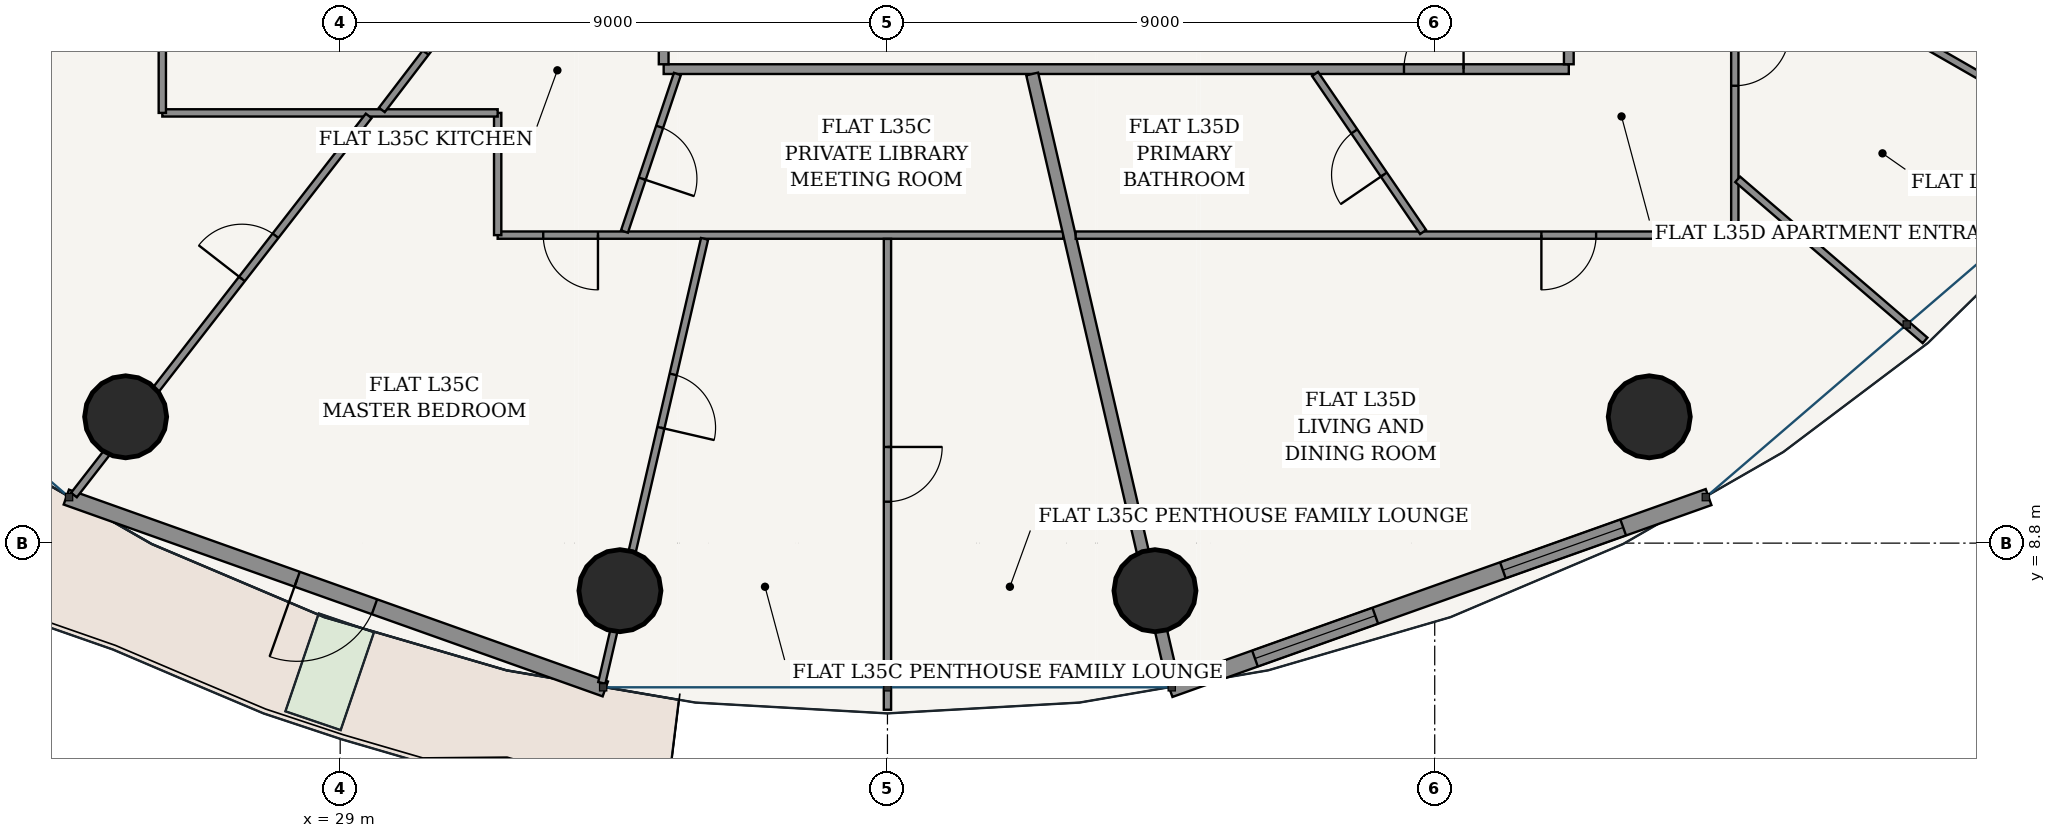
"""IFC4 building model, lengths in metres.
Left out: names, types, materials, properties, quantities, classifications, styles, units other than length and angle.
Written with IfcOpenShell. Run it as: python <this file> out.ifc"""

import sys

from ifc_helpers import new_model, si_unit, direction, frame, frame_2d, origin, origin_2d, place, context, subcontext, project, spatial, rectangle, hollow_circle, extrude, source, transform, mapped, element, fill, save


model = new_model("IFC4")
c1 = context("Model", 3, precision=1e-05, world=origin(), true_north=direction((-0.2419218956, 0.970295726276)))
c2 = subcontext(c1, "Body", "Model", "MODEL_VIEW")
j1 = project(units=[si_unit("LENGTHUNIT", "METRE"), si_unit("PLANEANGLEUNIT", "RADIAN")], contexts=[c1])
p1 = place(None, origin())
s1 = spatial("IfcSite", under=j1, at=p1, CompositionType="ELEMENT")
p2 = place(p1, origin())
s2 = spatial("IfcBuilding", under=s1, at=p2, CompositionType="ELEMENT")
p3 = place(p2, frame((0.0, 0.0, 135.4)))
s3 = spatial("IfcBuildingStorey", under=s2, at=p3, CompositionType="ELEMENT", Elevation=135.4)
for number, where, z_axis, x_axis in (
    (1, (25.472, 10.877, 0.0), (0.0, 0.0, 1.0), (1.0, 0.0, 0.0)),
    (2, (33.601, 8.018, 0.0), (0.0, 0.0, 1.0), (1.0, 0.0, 0.0)),
    (3, (42.399, 8.018, 0.0), (0.0, 0.0, 1.0), (1.0, 0.0, 0.0)),
    (4, (50.528, 10.877, 0.0), (0.0, 0.0, 1.0), (1.0, 0.0, 0.0)),
):
    element("IfcColumn", number, at=place(p3, frame(where, z_axis=z_axis, x_axis=x_axis)), inside=s3, PredefinedType="COLUMN", context=c2, shape_type="SweptSolid", body=[
        extrude(hollow_circle(Radius=0.675, WallThickness=0.042, at=origin_2d()), origin(), (0.0, 0.0, 1.0), 3.6),
    ])
p4 = place(p3, frame((24.497, 9.557, 0.0), z_axis=(0.0, 0.0, 1.0), x_axis=(0.942103604331, -0.335321932934, 0.0)))
e5 = element("IfcWall", 5, at=p4, inside=s3, PredefinedType="SOLIDWALL", context=c2, shape_type="SweptSolid", body=[
    extrude(rectangle(XDim=9.408, YDim=0.26, at=frame_2d((4.704, 0.0))), origin(), (0.0, 0.0, 1.0), 3.33),
])
p5 = place(p4, frame((4.029, 0.0, 0.0)))
e6 = element("IfcOpeningElement", 6, at=p5, cuts=e5, PredefinedType="OPENING", context=c2, shape_type="SweptSolid", body=[
    extrude(rectangle(XDim=1.35, YDim=2.2, at=frame_2d((0.675, 1.1))), frame((0.0, 0.14, 0.0), z_axis=(0.0, -1.0, 0.0), x_axis=(1.0, 0.0, 0.0)), (0.0, 0.0, 1.0), 0.28),
])
p6 = place(p3, frame((42.64, 6.402, 0.0), z_axis=(0.0, 0.0, 1.0), x_axis=(0.942103604331, 0.335321932934, 0.0)))
e7 = element("IfcWall", 7, at=p6, inside=s3, PredefinedType="SOLIDWALL", context=c2, shape_type="SweptSolid", body=[
    extrude(rectangle(XDim=9.408, YDim=0.28, at=frame_2d((4.704, 0.0))), origin(), (0.0, 0.0, 1.0), 3.33),
])
p7 = place(p6, frame((1.49, 0.0, 0.85)))
e8 = element("IfcOpeningElement", 8, at=p7, cuts=e7, PredefinedType="OPENING", context=c2, shape_type="SweptSolid", body=[
    extrude(rectangle(XDim=2.1, YDim=1.95, at=frame_2d((1.05, 0.975))), frame((0.0, 0.15, 0.0), z_axis=(0.0, -1.0, 0.0), x_axis=(1.0, 0.0, 0.0)), (0.0, 0.0, 1.0), 0.3),
])
p8 = place(p6, frame((5.818, 0.0, 0.85)))
e9 = element("IfcOpeningElement", 9, at=p8, cuts=e7, PredefinedType="OPENING", context=c2, shape_type="SweptSolid", body=[
    extrude(rectangle(XDim=2.1, YDim=1.95, at=frame_2d((1.05, 0.975))), frame((0.0, 0.15, 0.0), z_axis=(0.0, -1.0, 0.0), x_axis=(1.0, 0.0, 0.0)), (0.0, 0.0, 1.0), 0.3),
])
p9 = place(p3, frame((34.32, 16.595, 0.0), z_axis=(0.0, 0.0, 1.0), x_axis=(1.0, 0.0, 0.0)))
e10 = element("IfcWall", 10, at=p9, inside=s3, PredefinedType="PARTITIONING", context=c2, shape_type="SweptSolid", body=[
    extrude(rectangle(XDim=14.885, YDim=0.16, at=frame_2d((7.442, 0.0))), origin(), (0.0, 0.0, 1.0), 2.776),
])
p10 = place(p9, frame((12.174, 0.0, 0.0)))
e11 = element("IfcOpeningElement", 11, at=p10, cuts=e10, PredefinedType="OPENING", context=c2, shape_type="SweptSolid", body=[
    extrude(rectangle(XDim=0.98, YDim=2.2, at=frame_2d((0.49, 1.1))), frame((0.0, 0.09, 0.0), z_axis=(0.0, -1.0, 0.0), x_axis=(1.0, 0.0, 0.0)), (0.0, 0.0, 1.0), 0.18),
])
p11 = place(p3, frame((34.32, 16.675, 0.0), z_axis=(0.0, 0.0, 1.0), x_axis=(0.0, 1.0, 0.0)))
e12 = element("IfcWall", 12, at=p11, inside=s3, PredefinedType="PARTITIONING", context=c2, shape_type="SweptSolid", body=[
    extrude(rectangle(XDim=1.85, YDim=0.16, at=frame_2d((0.925, 0.0))), origin(), (0.0, 0.0, 1.0), 3.33),
])
p12 = place(p11, frame((0.435, 0.0, 0.0)))
e13 = element("IfcOpeningElement", 13, at=p12, cuts=e12, PredefinedType="OPENING", context=c2, shape_type="SweptSolid", body=[
    extrude(rectangle(XDim=0.98, YDim=2.2, at=frame_2d((0.49, 1.1))), frame((0.0, 0.09, 0.0), z_axis=(0.0, -1.0, 0.0), x_axis=(1.0, 0.0, 0.0)), (0.0, 0.0, 1.0), 0.18),
])
p13 = place(p3, frame((49.205, 16.675, 0.0), z_axis=(0.0, 0.0, 1.0), x_axis=(0.0, 1.0, 0.0)))
e14 = element("IfcWall", 14, at=p13, inside=s3, PredefinedType="PARTITIONING", context=c2, shape_type="SweptSolid", body=[
    extrude(rectangle(XDim=18.4, YDim=0.16, at=frame_2d((9.2, 0.0))), origin(), (0.0, 0.0, 1.0), 2.776),
])
p14 = place(p3, frame((40.892, 13.865, 0.0), z_axis=(0.0, 0.0, 1.0), x_axis=(-1.0, 0.0, 0.0)))
e15 = element("IfcWall", 15, at=p14, inside=s3, PredefinedType="PARTITIONING", context=c2, shape_type="SweptSolid", body=[
    extrude(rectangle(XDim=9.302, YDim=0.12, at=frame_2d((4.651, 0.0))), origin(), (0.0, 0.0, 1.0), 2.776),
])
p15 = place(p14, frame((7.652, 0.0, 0.0)))
e16 = element("IfcOpeningElement", 16, at=p15, cuts=e15, PredefinedType="OPENING", context=c2, shape_type="SweptSolid", body=[
    extrude(rectangle(XDim=0.9, YDim=2.15, at=frame_2d((0.45, 1.075))), frame((0.0, 0.07, 0.0), z_axis=(0.0, -1.0, 0.0), x_axis=(1.0, 0.0, 0.0)), (0.0, 0.0, 1.0), 0.14),
])
p16 = place(p3, frame((31.59, 13.865, 0.0), z_axis=(0.0, 0.0, 1.0), x_axis=(0.0, 1.0, 0.0)))
e17 = element("IfcWall", 17, at=p16, inside=s3, PredefinedType="PARTITIONING", context=c2, shape_type="SweptSolid", body=[
    extrude(rectangle(XDim=2.01, YDim=0.12, at=frame_2d((1.005, 0.0))), origin(), (0.0, 0.0, 1.0), 3.005),
])
p17 = place(p3, frame((31.59, 15.875, 0.0), z_axis=(0.0, 0.0, 1.0), x_axis=(-1.0, 0.0, 0.0)))
e18 = element("IfcWall", 18, at=p17, inside=s3, PredefinedType="PARTITIONING", context=c2, shape_type="SweptSolid", body=[
    extrude(rectangle(XDim=5.515, YDim=0.12, at=frame_2d((2.758, 0.0))), origin(), (0.0, 0.0, 1.0), 2.776),
])
p18 = place(p3, frame((26.075, 15.875, 0.0), z_axis=(0.0, 0.0, 1.0), x_axis=(0.0, 1.0, 0.0)))
e19 = element("IfcWall", 19, at=p18, inside=s3, PredefinedType="PARTITIONING", context=c2, shape_type="SweptSolid", body=[
    extrude(rectangle(XDim=5.715, YDim=0.12, at=frame_2d((2.857, 0.0))), origin(), (0.0, 0.0, 1.0), 2.776),
])
p19 = place(p3, frame((29.469, 15.826, 0.0), z_axis=(0.0, 0.0, 1.0), x_axis=(-0.61373942367, -0.789508657225, 0.0)))
e20 = element("IfcWall", 20, at=p19, inside=s3, PredefinedType="PARTITIONING", context=c2, shape_type="SweptSolid", body=[
    extrude(rectangle(XDim=7.898, YDim=0.12, at=frame_2d((3.949, 0.0))), origin(), (0.0, 0.0, 1.0), 2.776),
])
p20 = place(p19, frame((2.496, 0.0, 0.0)))
e21 = element("IfcOpeningElement", 21, at=p20, cuts=e20, PredefinedType="OPENING", context=c2, shape_type="SweptSolid", body=[
    extrude(rectangle(XDim=0.9, YDim=2.15, at=frame_2d((0.45, 1.075))), frame((0.0, 0.07, 0.0), z_axis=(0.0, -1.0, 0.0), x_axis=(1.0, 0.0, 0.0)), (0.0, 0.0, 1.0), 0.14),
])
p21 = place(p3, frame((34.992, 13.805, 0.0), z_axis=(0.0, 0.0, 1.0), x_axis=(-0.225447000045, -0.974255433739, 0.0)))
e22 = element("IfcWall", 22, at=p21, inside=s3, PredefinedType="PARTITIONING", context=c2, shape_type="SweptSolid", body=[
    extrude(rectangle(XDim=7.496, YDim=0.12, at=frame_2d((3.748, 0.0))), origin(), (0.0, 0.0, 1.0), 2.776),
])
p22 = place(p21, frame((2.289, 0.0, 0.0)))
e23 = element("IfcOpeningElement", 23, at=p22, cuts=e22, PredefinedType="OPENING", context=c2, shape_type="SweptSolid", body=[
    extrude(rectangle(XDim=0.9, YDim=2.15, at=frame_2d((0.45, 1.075))), frame((0.0, 0.07, 0.0), z_axis=(0.0, -1.0, 0.0), x_axis=(1.0, 0.0, 0.0)), (0.0, 0.0, 1.0), 0.14),
])
p23 = place(p3, frame((38.0, 13.803, 0.0), z_axis=(0.0, 0.0, 1.0), x_axis=(0.0, -1.0, 0.0)))
e24 = element("IfcWall", 24, at=p23, inside=s3, PredefinedType="PARTITIONING", context=c2, shape_type="SweptSolid", body=[
    extrude(rectangle(XDim=7.743, YDim=0.12, at=frame_2d((3.872, 0.0))), origin(), (0.0, 0.0, 1.0), 2.846),
])
p24 = place(p23, frame((3.421, 0.0, 0.0)))
e25 = element("IfcOpeningElement", 25, at=p24, cuts=e24, PredefinedType="OPENING", context=c2, shape_type="SweptSolid", body=[
    extrude(rectangle(XDim=0.9, YDim=2.15, at=frame_2d((0.45, 1.075))), frame((0.0, 0.07, 0.0), z_axis=(0.0, -1.0, 0.0), x_axis=(1.0, 0.0, 0.0)), (0.0, 0.0, 1.0), 0.14),
])
p25 = place(p3, frame((31.674, 18.525, 0.0), z_axis=(0.0, 0.0, 1.0), x_axis=(-0.607372594471, -0.794417101708, 0.0)))
e26 = element("IfcWall", 26, at=p25, inside=s3, PredefinedType="PARTITIONING", context=c2, shape_type="SweptSolid", body=[
    extrude(rectangle(XDim=3.274, YDim=0.12, at=frame_2d((1.637, 0.0))), origin(), (0.0, 0.0, 1.0), 3.33),
])
p26 = place(p25, frame((1.187, 0.0, 0.0)))
e27 = element("IfcOpeningElement", 27, at=p26, cuts=e26, PredefinedType="OPENING", context=c2, shape_type="SweptSolid", body=[
    extrude(rectangle(XDim=0.9, YDim=2.15, at=frame_2d((0.45, 1.075))), frame((0.0, 0.07, 0.0), z_axis=(0.0, -1.0, 0.0), x_axis=(1.0, 0.0, 0.0)), (0.0, 0.0, 1.0), 0.14),
])
p27 = place(p3, frame((34.545, 16.515, 0.0), z_axis=(0.0, 0.0, 1.0), x_axis=(-0.318424178642, -0.947948333221, 0.0)))
e28 = element("IfcWall", 28, at=p27, inside=s3, PredefinedType="PARTITIONING", context=c2, shape_type="SweptSolid", body=[
    extrude(rectangle(XDim=2.733, YDim=0.12, at=frame_2d((1.367, 0.0))), origin(), (0.0, 0.0, 1.0), 3.33),
])
p28 = place(p27, frame((0.917, 0.0, 0.0)))
e29 = element("IfcOpeningElement", 29, at=p28, cuts=e28, PredefinedType="OPENING", context=c2, shape_type="SweptSolid", body=[
    extrude(rectangle(XDim=0.9, YDim=2.15, at=frame_2d((0.45, 1.075))), frame((0.0, 0.07, 0.0), z_axis=(0.0, -1.0, 0.0), x_axis=(1.0, 0.0, 0.0)), (0.0, 0.0, 1.0), 0.14),
])
p29 = place(p3, frame((40.38, 16.515, 0.0), z_axis=(0.0, 0.0, 1.0), x_axis=(0.225473598067, -0.974249278457, 0.0)))
e30 = element("IfcWall", 30, at=p29, inside=s3, PredefinedType="PARTITIONING", context=c2, shape_type="SweptSolid", body=[
    extrude(rectangle(XDim=10.278, YDim=0.2, at=frame_2d((5.139, 0.0))), origin(), (0.0, 0.0, 1.0), 2.776),
])
p30 = place(p3, frame((51.935, 29.08, 0.0), z_axis=(0.0, 0.0, 1.0), x_axis=(0.0, -1.0, 0.0)))
e31 = element("IfcWall", 31, at=p30, inside=s3, PredefinedType="PARTITIONING", context=c2, shape_type="SweptSolid", body=[
    extrude(rectangle(XDim=15.215, YDim=0.12, at=frame_2d((7.608, 0.0))), origin(), (0.0, 0.0, 1.0), 2.776),
])
p31 = place(p30, frame((11.859, 0.0, 0.0)))
e32 = element("IfcOpeningElement", 32, at=p31, cuts=e31, PredefinedType="OPENING", context=c2, shape_type="SweptSolid", body=[
    extrude(rectangle(XDim=0.9, YDim=2.15, at=frame_2d((0.45, 1.075))), frame((0.0, 0.07, 0.0), z_axis=(0.0, -1.0, 0.0), x_axis=(1.0, 0.0, 0.0)), (0.0, 0.0, 1.0), 0.14),
])
p32 = place(p30, frame((7.49, 0.0, 0.0)))
e33 = element("IfcOpeningElement", 33, at=p32, cuts=e31, PredefinedType="OPENING", context=c2, shape_type="SweptSolid", body=[
    extrude(rectangle(XDim=0.9, YDim=2.15, at=frame_2d((0.45, 1.075))), frame((0.0, 0.07, 0.0), z_axis=(0.0, -1.0, 0.0), x_axis=(1.0, 0.0, 0.0)), (0.0, 0.0, 1.0), 0.14),
])
p33 = place(p3, frame((51.935, 13.865, 0.0), z_axis=(0.0, 0.0, 1.0), x_axis=(-1.0, 0.0, 0.0)))
e34 = element("IfcWall", 34, at=p33, inside=s3, PredefinedType="PARTITIONING", context=c2, shape_type="SweptSolid", body=[
    extrude(rectangle(XDim=10.84, YDim=0.12, at=frame_2d((5.42, 0.0))), origin(), (0.0, 0.0, 1.0), 2.776),
])
p34 = place(p33, frame((2.281, 0.0, 0.0)))
e35 = element("IfcOpeningElement", 35, at=p34, cuts=e34, PredefinedType="OPENING", context=c2, shape_type="SweptSolid", body=[
    extrude(rectangle(XDim=0.9, YDim=2.15, at=frame_2d((0.45, 1.075))), frame((0.0, 0.07, 0.0), z_axis=(0.0, -1.0, 0.0), x_axis=(1.0, 0.0, 0.0)), (0.0, 0.0, 1.0), 0.14),
])
p35 = place(p3, frame((51.982, 14.782, 0.0), z_axis=(0.0, 0.0, 1.0), x_axis=(0.758356837469, -0.651839632935, 0.0)))
e36 = element("IfcWall", 36, at=p35, inside=s3, PredefinedType="PARTITIONING", context=c2, shape_type="SweptSolid", body=[
    extrude(rectangle(XDim=4.064, YDim=0.12, at=frame_2d((2.032, 0.0))), origin(), (0.0, 0.0, 1.0), 2.846),
])
p36 = place(p3, frame((51.989, 18.766, 0.0), z_axis=(0.0, 0.0, 1.0), x_axis=(0.86717064002, -0.498011125466, 0.0)))
e37 = element("IfcWall", 37, at=p36, inside=s3, PredefinedType="PARTITIONING", context=c2, shape_type="SweptSolid", body=[
    extrude(rectangle(XDim=6.961, YDim=0.12, at=frame_2d((3.48, 0.0))), origin(), (0.0, 0.0, 1.0), 2.776),
])
p37 = place(p3, frame((45.032, 16.515, 0.0), z_axis=(0.0, 0.0, 1.0), x_axis=(0.564486512722, -0.825442291717, 0.0)))
e38 = element("IfcWall", 38, at=p37, inside=s3, PredefinedType="PARTITIONING", context=c2, shape_type="SweptSolid", body=[
    extrude(rectangle(XDim=3.148, YDim=0.12, at=frame_2d((1.574, 0.0))), origin(), (0.0, 0.0, 1.0), 3.005),
])
p38 = place(p37, frame((1.144, 0.0, 0.0)))
e39 = element("IfcOpeningElement", 39, at=p38, cuts=e38, PredefinedType="OPENING", context=c2, shape_type="SweptSolid", body=[
    extrude(rectangle(XDim=0.86, YDim=2.15, at=frame_2d((0.43, 1.075))), frame((0.0, 0.07, 0.0), z_axis=(0.0, -1.0, 0.0), x_axis=(1.0, 0.0, 0.0)), (0.0, 0.0, 1.0), 0.14),
])
m1 = source(origin(), c2, "Body", "SweptSolid", [
    extrude(rectangle(XDim=1.35, YDim=2.2, at=frame_2d((0.675, 1.1))), frame((0.0, 0.025, 0.0), z_axis=(0.0, -1.0, 0.0), x_axis=(1.0, 0.0, 0.0)), (0.0, 0.0, 1.0), 0.05),
])
p39 = place(p5, frame((1.35, 0.0, 0.0), z_axis=(0.0, 0.0, 1.0), x_axis=(-1.0, 0.0, 0.0)))
e40 = element("IfcDoor", 40, at=p39, inside=s3, OperationType="SINGLE_SWING_RIGHT", PredefinedType="DOOR", context=c2, shape_type="MappedRepresentation", body=[
    mapped(m1, transform((0.0, 0.0, 0.0), scale=1.0)),
])
fill(e6, e40)
m2 = source(origin(), c2, "Body", "SweptSolid", [
    extrude(rectangle(XDim=2.1, YDim=1.95, at=frame_2d((1.05, 0.975))), frame((0.0, 0.03, 0.0), z_axis=(0.0, -1.0, 0.0), x_axis=(1.0, 0.0, 0.0)), (0.0, 0.0, 1.0), 0.06),
])
p40 = place(p7, origin())
e41 = element("IfcWindow", 41, at=p40, inside=s3, PartitioningType="SINGLE_PANEL", PredefinedType="WINDOW", context=c2, shape_type="MappedRepresentation", body=[
    mapped(m2, transform((0.0, 0.0, 0.0), scale=1.0)),
])
fill(e8, e41)
p41 = place(p8, origin())
e42 = element("IfcWindow", 42, at=p41, inside=s3, PartitioningType="SINGLE_PANEL", PredefinedType="WINDOW", context=c2, shape_type="MappedRepresentation", body=[
    mapped(m2, transform((0.0, 0.0, 0.0), scale=1.0)),
])
fill(e9, e42)
m3 = source(origin(), c2, "Body", "SweptSolid", [
    extrude(rectangle(XDim=0.9, YDim=2.15, at=frame_2d((0.45, 1.075))), frame((0.0, 0.025, 0.0), z_axis=(0.0, -1.0, 0.0), x_axis=(1.0, 0.0, 0.0)), (0.0, 0.0, 1.0), 0.05),
])
p42 = place(p26, frame((0.9, 0.0, 0.0), z_axis=(0.0, 0.0, 1.0), x_axis=(-1.0, 0.0, 0.0)))
e43 = element("IfcDoor", 43, at=p42, inside=s3, OperationType="SINGLE_SWING_LEFT", PredefinedType="DOOR", context=c2, shape_type="MappedRepresentation", body=[
    mapped(m3, transform((0.0, 0.0, 0.0), scale=1.0)),
])
fill(e27, e43)
p43 = place(p28, origin())
e44 = element("IfcDoor", 44, at=p43, inside=s3, OperationType="SINGLE_SWING_RIGHT", PredefinedType="DOOR", context=c2, shape_type="MappedRepresentation", body=[
    mapped(m3, transform((0.0, 0.0, 0.0), scale=1.0)),
])
fill(e29, e44)
p44 = place(p15, origin())
e45 = element("IfcDoor", 45, at=p44, inside=s3, OperationType="SINGLE_SWING_LEFT", PredefinedType="DOOR", context=c2, shape_type="MappedRepresentation", body=[
    mapped(m3, transform((0.0, 0.0, 0.0), scale=1.0)),
])
fill(e16, e45)
p45 = place(p20, frame((0.9, 0.0, 0.0), z_axis=(0.0, 0.0, 1.0), x_axis=(-1.0, 0.0, 0.0)))
e46 = element("IfcDoor", 46, at=p45, inside=s3, OperationType="SINGLE_SWING_LEFT", PredefinedType="DOOR", context=c2, shape_type="MappedRepresentation", body=[
    mapped(m3, transform((0.0, 0.0, 0.0), scale=1.0)),
])
fill(e21, e46)
p46 = place(p22, origin())
e47 = element("IfcDoor", 47, at=p46, inside=s3, OperationType="SINGLE_SWING_RIGHT", PredefinedType="DOOR", context=c2, shape_type="MappedRepresentation", body=[
    mapped(m3, transform((0.0, 0.0, 0.0), scale=1.0)),
])
fill(e23, e47)
p47 = place(p24, origin())
e48 = element("IfcDoor", 48, at=p47, inside=s3, OperationType="SINGLE_SWING_LEFT", PredefinedType="DOOR", context=c2, shape_type="MappedRepresentation", body=[
    mapped(m3, transform((0.0, 0.0, 0.0), scale=1.0)),
])
fill(e25, e48)
m4 = source(origin(), c2, "Body", "SweptSolid", [
    extrude(rectangle(XDim=0.98, YDim=2.2, at=frame_2d((0.49, 1.1))), frame((0.0, 0.025, 0.0), z_axis=(0.0, -1.0, 0.0), x_axis=(1.0, 0.0, 0.0)), (0.0, 0.0, 1.0), 0.05),
])
p48 = place(p10, origin())
e49 = element("IfcDoor", 49, at=p48, inside=s3, OperationType="SINGLE_SWING_RIGHT", PredefinedType="DOOR", context=c2, shape_type="MappedRepresentation", body=[
    mapped(m4, transform((0.0, 0.0, 0.0), scale=1.0)),
])
fill(e11, e49)
m5 = source(origin(), c2, "Body", "SweptSolid", [
    extrude(rectangle(XDim=0.86, YDim=2.15, at=frame_2d((0.43, 1.075))), frame((0.0, 0.025, 0.0), z_axis=(0.0, -1.0, 0.0), x_axis=(1.0, 0.0, 0.0)), (0.0, 0.0, 1.0), 0.05),
])
p49 = place(p38, frame((0.86, 0.0, 0.0), z_axis=(0.0, 0.0, 1.0), x_axis=(-1.0, 0.0, 0.0)))
e50 = element("IfcDoor", 50, at=p49, inside=s3, OperationType="SINGLE_SWING_LEFT", PredefinedType="DOOR", context=c2, shape_type="MappedRepresentation", body=[
    mapped(m5, transform((0.0, 0.0, 0.0), scale=1.0)),
])
fill(e39, e50)
p50 = place(p34, origin())
e51 = element("IfcDoor", 51, at=p50, inside=s3, OperationType="SINGLE_SWING_RIGHT", PredefinedType="DOOR", context=c2, shape_type="MappedRepresentation", body=[
    mapped(m3, transform((0.0, 0.0, 0.0), scale=1.0)),
])
fill(e35, e51)
p51 = place(p31, origin())
e52 = element("IfcDoor", 52, at=p51, inside=s3, OperationType="SINGLE_SWING_LEFT", PredefinedType="DOOR", context=c2, shape_type="MappedRepresentation", body=[
    mapped(m3, transform((0.0, 0.0, 0.0), scale=1.0)),
])
fill(e32, e52)
save(model, sys.argv[1])
